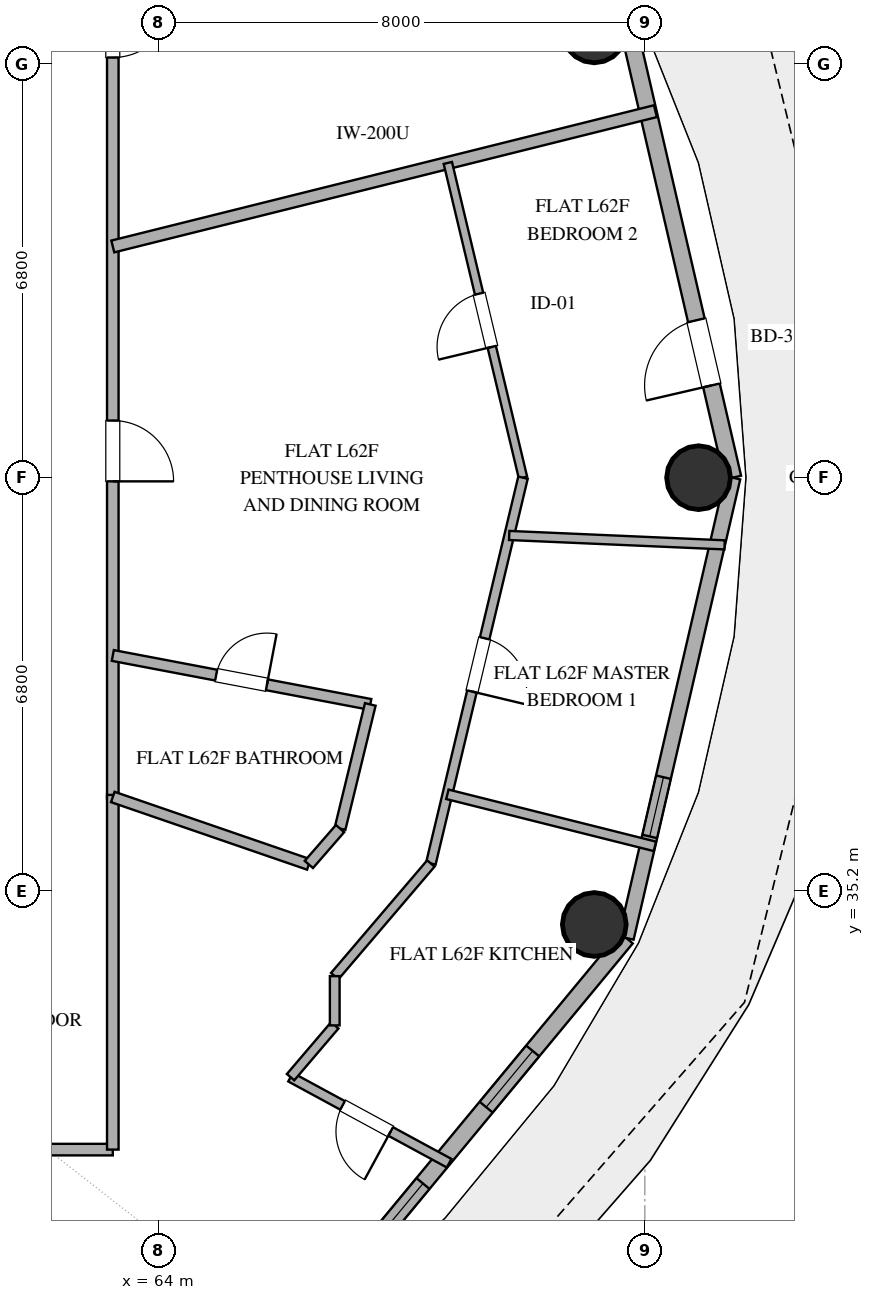
"""IFC4 building model, lengths in metres.
Left out: names, types, materials, properties, quantities, classifications, styles, units other than length and angle.
Written with IfcOpenShell. Run it as: python <this file> out.ifc"""

import sys

from ifc_helpers import new_model, si_unit, direction, frame, frame_2d, origin, origin_2d, place, context, subcontext, project, spatial, rectangle, hollow_circle, extrude, element, fill, save


model = new_model("IFC4")
c1 = context("Model", 3, precision=1e-05, world=origin(), true_north=direction((0.0, 1.0)))
c2 = subcontext(c1, "Body", "Model", "MODEL_VIEW")
j1 = project(units=[si_unit("LENGTHUNIT", "METRE"), si_unit("PLANEANGLEUNIT", "RADIAN")], contexts=[c1])
p1 = place(None, origin())
s1 = spatial("IfcSite", under=j1, at=p1, CompositionType="ELEMENT")
p2 = place(p1, origin())
s2 = spatial("IfcBuilding", under=s1, at=p2, CompositionType="ELEMENT")
p3 = place(p2, frame((0.0, 0.0, 242.4)))
s3 = spatial("IfcBuildingStorey", under=s2, at=p3, CompositionType="ELEMENT", Elevation=242.4)
for number, where, z_axis, x_axis in (
    (1, (72.883, 42.0, 0.0), (0.0, 0.0, 1.0), (1.0, 0.0, 0.0)),
    (2, (71.169, 49.347, 0.0), (0.0, 0.0, 1.0), (1.0, 0.0, 0.0)),
    (3, (71.169, 34.653, 0.0), (0.0, 0.0, 1.0), (1.0, 0.0, 0.0)),
):
    element("IfcColumn", number, at=place(p3, frame(where, z_axis=z_axis, x_axis=x_axis)), inside=s3, PredefinedType="COLUMN", context=c2, shape_type="SweptSolid", body=[
        extrude(hollow_circle(Radius=0.525, WallThickness=0.028, at=origin_2d()), origin(), (0.0, 0.0, 1.0), 3.36),
    ])
p4 = place(p3, frame((73.447, 42.0, 0.0), z_axis=(0.0, 0.0, 1.0), x_axis=(-0.225635078214, 0.974211892495, 0.0)))
e4 = element("IfcWall", 4, at=p4, inside=s3, PredefinedType="SOLIDWALL", context=c2, shape_type="SweptSolid", body=[
    extrude(rectangle(XDim=7.77, YDim=0.28, at=frame_2d((3.885, 0.0))), origin(), (0.0, 0.0, 1.0), 3.36),
])
p5 = place(p4, frame((1.557, 0.0, 0.0)))
e5 = element("IfcOpeningElement", 5, at=p5, cuts=e4, PredefinedType="OPENING", context=c2, shape_type="SweptSolid", body=[
    extrude(rectangle(XDim=1.1, YDim=2.25, at=frame_2d((0.55, 1.125))), frame((0.0, 0.15, 0.0), z_axis=(0.0, -1.0, 0.0), x_axis=(1.0, 0.0, 0.0)), (0.0, 0.0, 1.0), 0.3),
])
p6 = place(p3, frame((66.383, 28.013, 0.0), z_axis=(0.0, 0.0, 1.0), x_axis=(0.63761509934, 0.770355103243, 0.0)))
e6 = element("IfcWall", 6, at=p6, inside=s3, PredefinedType="SOLIDWALL", context=c2, shape_type="SweptSolid", body=[
    extrude(rectangle(XDim=8.33, YDim=0.28, at=frame_2d((4.165, 0.0))), origin(), (0.0, 0.0, 1.0), 3.36),
])
p7 = place(p6, frame((1.738, 0.0, 0.85)))
e7 = element("IfcOpeningElement", 7, at=p7, cuts=e6, PredefinedType="OPENING", context=c2, shape_type="SweptSolid", body=[
    extrude(rectangle(XDim=1.35, YDim=1.8, at=frame_2d((0.675, 0.9))), frame((0.0, 0.15, 0.0), z_axis=(0.0, -1.0, 0.0), x_axis=(1.0, 0.0, 0.0)), (0.0, 0.0, 1.0), 0.3),
])
p8 = place(p6, frame((4.718, 0.0, 0.85)))
e8 = element("IfcOpeningElement", 8, at=p8, cuts=e6, PredefinedType="OPENING", context=c2, shape_type="SweptSolid", body=[
    extrude(rectangle(XDim=1.2, YDim=1.8, at=frame_2d((0.6, 0.9))), frame((0.0, 0.15, 0.0), z_axis=(0.0, -1.0, 0.0), x_axis=(1.0, 0.0, 0.0)), (0.0, 0.0, 1.0), 0.3),
])
p9 = place(p3, frame((71.694, 34.43, 0.0), z_axis=(0.0, 0.0, 1.0), x_axis=(0.225635078214, 0.974211892495, 0.0)))
e9 = element("IfcWall", 9, at=p9, inside=s3, PredefinedType="SOLIDWALL", context=c2, shape_type="SweptSolid", body=[
    extrude(rectangle(XDim=7.77, YDim=0.25, at=frame_2d((3.885, 0.0))), origin(), (0.0, 0.0, 1.0), 3.36),
])
p10 = place(p9, frame((1.714, 0.0, 1.42)))
e10 = element("IfcOpeningElement", 10, at=p10, cuts=e9, PredefinedType="OPENING", context=c2, shape_type="SweptSolid", body=[
    extrude(rectangle(XDim=1.0, YDim=1.05, at=frame_2d((0.5, 0.525))), frame((0.0, 0.135, 0.0), z_axis=(0.0, -1.0, 0.0), x_axis=(1.0, 0.0, 0.0)), (0.0, 0.0, 1.0), 0.27),
])
p11 = place(p3, frame((63.25, 30.95, 0.0), z_axis=(0.0, 0.0, 1.0), x_axis=(-1.0, 0.0, 0.0)))
e11 = element("IfcWall", 11, at=p11, inside=s3, PredefinedType="PARTITIONING", context=c2, shape_type="SweptSolid", body=[
    extrude(rectangle(XDim=19.715, YDim=0.19, at=frame_2d((9.857, 0.0))), origin(), (0.0, 0.0, 1.0), 2.72),
])
p12 = place(p11, frame((11.632, 0.0, 0.0)))
e12 = element("IfcOpeningElement", 12, at=p12, cuts=e11, PredefinedType="OPENING", context=c2, shape_type="SweptSolid", body=[
    extrude(rectangle(XDim=1.0, YDim=2.2, at=frame_2d((0.5, 1.1))), frame((0.0, 0.105, 0.0), z_axis=(0.0, -1.0, 0.0), x_axis=(1.0, 0.0, 0.0)), (0.0, 0.0, 1.0), 0.21),
])
p13 = place(p3, frame((63.25, 53.05, 0.0), z_axis=(0.0, 0.0, 1.0), x_axis=(0.0, -1.0, 0.0)))
e13 = element("IfcWall", 13, at=p13, inside=s3, PredefinedType="PARTITIONING", context=c2, shape_type="SweptSolid", body=[
    extrude(rectangle(XDim=16.335, YDim=0.19, at=frame_2d((8.167, 0.0))), origin(), (0.0, 0.0, 1.0), 2.72),
])
p14 = place(p13, frame((3.14, 0.0, 0.0)))
e14 = element("IfcOpeningElement", 14, at=p14, cuts=e13, PredefinedType="OPENING", context=c2, shape_type="SweptSolid", body=[
    extrude(rectangle(XDim=1.0, YDim=2.2, at=frame_2d((0.5, 1.1))), frame((0.0, 0.105, 0.0), z_axis=(0.0, -1.0, 0.0), x_axis=(1.0, 0.0, 0.0)), (0.0, 0.0, 1.0), 0.21),
])
p15 = place(p13, frame((10.111, 0.0, 0.0)))
e15 = element("IfcOpeningElement", 15, at=p15, cuts=e13, PredefinedType="OPENING", context=c2, shape_type="SweptSolid", body=[
    extrude(rectangle(XDim=1.0, YDim=2.2, at=frame_2d((0.5, 1.1))), frame((0.0, 0.105, 0.0), z_axis=(0.0, -1.0, 0.0), x_axis=(1.0, 0.0, 0.0)), (0.0, 0.0, 1.0), 0.21),
])
p16 = place(p3, frame((63.25, 36.783, 0.0), z_axis=(0.0, 0.0, 1.0), x_axis=(0.0, -1.0, 0.0)))
e16 = element("IfcWall", 16, at=p16, inside=s3, PredefinedType="PARTITIONING", context=c2, shape_type="SweptSolid", body=[
    extrude(rectangle(XDim=5.833, YDim=0.19, at=frame_2d((2.917, 0.0))), origin(), (0.0, 0.0, 1.0), 2.72),
])
p17 = place(p3, frame((63.25, 45.802, 0.0), z_axis=(0.0, 0.0, 1.0), x_axis=(0.970293772743, 0.241929730659, 0.0)))
e17 = element("IfcWall", 17, at=p17, inside=s3, PredefinedType="PARTITIONING", context=c2, shape_type="SweptSolid", body=[
    extrude(rectangle(XDim=9.197, YDim=0.2, at=frame_2d((4.599, 0.0))), origin(), (0.0, 0.0, 1.0), 2.72),
])
p18 = place(p3, frame((69.996, 42.0, 0.0), z_axis=(0.0, 0.0, 1.0), x_axis=(-0.232321322639, 0.972639091877, 0.0)))
e18 = element("IfcWall", 18, at=p18, inside=s3, PredefinedType="PARTITIONING", context=c2, shape_type="SweptSolid", body=[
    extrude(rectangle(XDim=5.322, YDim=0.14, at=frame_2d((2.661, 0.0))), origin(), (0.0, 0.0, 1.0), 2.72),
])
p19 = place(p18, frame((2.211, 0.0, 0.0)))
e19 = element("IfcOpeningElement", 19, at=p19, cuts=e18, PredefinedType="OPENING", context=c2, shape_type="SweptSolid", body=[
    extrude(rectangle(XDim=0.9, YDim=2.1, at=frame_2d((0.45, 1.05))), frame((0.0, 0.08, 0.0), z_axis=(0.0, -1.0, 0.0), x_axis=(1.0, 0.0, 0.0)), (0.0, 0.0, 1.0), 0.16),
])
p20 = place(p3, frame((69.996, 42.0, 0.0), z_axis=(0.0, 0.0, 1.0), x_axis=(-0.232298462197, -0.972644551962, 0.0)))
e20 = element("IfcWall", 20, at=p20, inside=s3, PredefinedType="PLUMBINGWALL", context=c2, shape_type="SweptSolid", body=[
    extrude(rectangle(XDim=6.523, YDim=0.16, at=frame_2d((3.262, 0.0))), origin(), (0.0, 0.0, 1.0), 2.72),
])
p21 = place(p20, frame((2.715, 0.0, 0.0)))
e21 = element("IfcOpeningElement", 21, at=p21, cuts=e20, PredefinedType="OPENING", context=c2, shape_type="SweptSolid", body=[
    extrude(rectangle(XDim=0.9, YDim=2.1, at=frame_2d((0.45, 1.05))), frame((0.0, 0.09, 0.0), z_axis=(0.0, -1.0, 0.0), x_axis=(1.0, 0.0, 0.0)), (0.0, 0.0, 1.0), 0.18),
])
p22 = place(p3, frame((63.25, 39.076, 0.0), z_axis=(0.0, 0.0, 1.0), x_axis=(0.982398995864, -0.186794574134, 0.0)))
e22 = element("IfcWall", 22, at=p22, inside=s3, PredefinedType="PLUMBINGWALL", context=c2, shape_type="SweptSolid", body=[
    extrude(rectangle(XDim=4.311, YDim=0.18, at=frame_2d((2.155, 0.0))), origin(), (0.0, 0.0, 1.0), 2.72),
])
p23 = place(p22, frame((1.73, 0.0, 0.0)))
e23 = element("IfcOpeningElement", 23, at=p23, cuts=e22, PredefinedType="OPENING", context=c2, shape_type="SweptSolid", body=[
    extrude(rectangle(XDim=0.85, YDim=2.1, at=frame_2d((0.425, 1.05))), frame((0.0, 0.1, 0.0), z_axis=(0.0, -1.0, 0.0), x_axis=(1.0, 0.0, 0.0)), (0.0, 0.0, 1.0), 0.2),
])
p24 = place(p3, frame((73.312, 40.895, 0.0), z_axis=(0.0, 0.0, 1.0), x_axis=(-0.999049912793, 0.043580635022, 0.0)))
e24 = element("IfcWall", 24, at=p24, inside=s3, PredefinedType="PARTITIONING", context=c2, shape_type="SweptSolid", body=[
    extrude(rectangle(XDim=3.546, YDim=0.15, at=frame_2d((1.773, 0.0))), origin(), (0.0, 0.0, 1.0), 2.72),
])
p25 = place(p3, frame((72.166, 35.937, 0.0), z_axis=(0.0, 0.0, 1.0), x_axis=(-0.96994628441, 0.24331914302, 0.0)))
e25 = element("IfcWall", 25, at=p25, inside=s3, PredefinedType="PLUMBINGWALL", context=c2, shape_type="SweptSolid", body=[
    extrude(rectangle(XDim=3.519, YDim=0.16, at=frame_2d((1.759, 0.0))), origin(), (0.0, 0.0, 1.0), 2.72),
])
p26 = place(p3, frame((66.474, 35.639, 0.0), z_axis=(0.0, 0.0, 1.0), x_axis=(-0.945522773294, 0.325555963211, 0.0)))
e26 = element("IfcWall", 26, at=p26, inside=s3, PredefinedType="PLUMBINGWALL", context=c2, shape_type="SweptSolid", body=[
    extrude(rectangle(XDim=3.41, YDim=0.18, at=frame_2d((1.705, 0.0))), origin(), (0.0, 0.0, 1.0), 2.72),
])
p27 = place(p3, frame((68.781, 30.727, 0.0), z_axis=(0.0, 0.0, 1.0), x_axis=(-0.878981574643, 0.476855734408, 0.0)))
e27 = element("IfcWall", 27, at=p27, inside=s3, PredefinedType="PLUMBINGWALL", context=c2, shape_type="SweptSolid", body=[
    extrude(rectangle(XDim=2.966, YDim=0.16, at=frame_2d((1.483, 0.0))), origin(), (0.0, 0.0, 1.0), 2.72),
])
p28 = place(p27, frame((1.093, 0.0, 0.0)))
e28 = element("IfcOpeningElement", 28, at=p28, cuts=e27, PredefinedType="OPENING", context=c2, shape_type="SweptSolid", body=[
    extrude(rectangle(XDim=0.9, YDim=2.1, at=frame_2d((0.45, 1.05))), frame((0.0, 0.09, 0.0), z_axis=(0.0, -1.0, 0.0), x_axis=(1.0, 0.0, 0.0)), (0.0, 0.0, 1.0), 0.18),
])
p29 = place(p3, frame((66.9, 33.803, 0.0), z_axis=(0.0, 0.0, 1.0), x_axis=(0.649270866973, 0.760557257082, 0.0)))
e29 = element("IfcWall", 29, at=p29, inside=s3, PredefinedType="PLUMBINGWALL", context=c2, shape_type="SweptSolid", body=[
    extrude(rectangle(XDim=2.435, YDim=0.16, at=frame_2d((1.218, 0.0))), origin(), (0.0, 0.0, 1.0), 2.72),
])
p30 = place(p3, frame((67.485, 38.271, 0.0), z_axis=(0.0, 0.0, 1.0), x_axis=(-0.236517575433, -0.971627210668, 0.0)))
e30 = element("IfcWall", 30, at=p30, inside=s3, PredefinedType="PLUMBINGWALL", context=c2, shape_type="SweptSolid", body=[
    extrude(rectangle(XDim=2.102, YDim=0.18, at=frame_2d((1.051, 0.0))), origin(), (0.0, 0.0, 1.0), 2.72),
])
p31 = place(p3, frame((66.174, 32.141, 0.0), z_axis=(0.0, 0.0, 1.0), x_axis=(0.648939178463, 0.760840287219, 0.0)))
e31 = element("IfcWall", 31, at=p31, inside=s3, PredefinedType="PLUMBINGWALL", context=c2, shape_type="SweptSolid", body=[
    extrude(rectangle(XDim=1.119, YDim=0.16, at=frame_2d((0.56, 0.0))), origin(), (0.0, 0.0, 1.0), 2.72),
])
p32 = place(p3, frame((66.9, 32.993, 0.0), z_axis=(0.0, 0.0, 1.0), x_axis=(0.0, 1.0, 0.0)))
e32 = element("IfcWall", 32, at=p32, inside=s3, PredefinedType="PLUMBINGWALL", context=c2, shape_type="SweptSolid", body=[
    extrude(rectangle(XDim=0.81, YDim=0.16, at=frame_2d((0.405, 0.0))), origin(), (0.0, 0.0, 1.0), 2.72),
])
p33 = place(p3, frame((66.988, 36.229, 0.0), z_axis=(0.0, 0.0, 1.0), x_axis=(-0.656402785683, -0.754410619589, 0.0)))
e33 = element("IfcWall", 33, at=p33, inside=s3, PredefinedType="PLUMBINGWALL", context=c2, shape_type="SweptSolid", body=[
    extrude(rectangle(XDim=0.782, YDim=0.18, at=frame_2d((0.391, 0.0))), origin(), (0.0, 0.0, 1.0), 2.72),
])
p34 = place(p5, origin())
e34 = element("IfcDoor", 34, at=p34, inside=s3, OperationType="SINGLE_SWING_LEFT", PredefinedType="DOOR", context=c2, shape_type="SweptSolid", body=[
    extrude(rectangle(XDim=1.1, YDim=2.25, at=frame_2d((0.55, 1.125))), frame((0.0, 0.025, 0.0), z_axis=(0.0, -1.0, 0.0), x_axis=(1.0, 0.0, 0.0)), (0.0, 0.0, 1.0), 0.05),
])
fill(e5, e34)
p35 = place(p7, origin())
e35 = element("IfcWindow", 35, at=p35, inside=s3, PartitioningType="SINGLE_PANEL", PredefinedType="WINDOW", context=c2, shape_type="SweptSolid", body=[
    extrude(rectangle(XDim=1.35, YDim=1.8, at=frame_2d((0.675, 0.9))), frame((0.0, 0.03, 0.0), z_axis=(0.0, -1.0, 0.0), x_axis=(1.0, 0.0, 0.0)), (0.0, 0.0, 1.0), 0.06),
])
fill(e7, e35)
p36 = place(p8, origin())
e36 = element("IfcWindow", 36, at=p36, inside=s3, PartitioningType="SINGLE_PANEL", PredefinedType="WINDOW", context=c2, shape_type="SweptSolid", body=[
    extrude(rectangle(XDim=1.2, YDim=1.8, at=frame_2d((0.6, 0.9))), frame((0.0, 0.03, 0.0), z_axis=(0.0, -1.0, 0.0), x_axis=(1.0, 0.0, 0.0)), (0.0, 0.0, 1.0), 0.06),
])
fill(e8, e36)
p37 = place(p10, origin())
e37 = element("IfcWindow", 37, at=p37, inside=s3, PartitioningType="SINGLE_PANEL", PredefinedType="WINDOW", context=c2, shape_type="SweptSolid", body=[
    extrude(rectangle(XDim=1.0, YDim=1.05, at=frame_2d((0.5, 0.525))), frame((0.0, 0.03, 0.0), z_axis=(0.0, -1.0, 0.0), x_axis=(1.0, 0.0, 0.0)), (0.0, 0.0, 1.0), 0.06),
])
fill(e10, e37)
p38 = place(p14, origin())
e38 = element("IfcDoor", 38, at=p38, inside=s3, OperationType="SINGLE_SWING_LEFT", PredefinedType="DOOR", context=c2, shape_type="SweptSolid", body=[
    extrude(rectangle(XDim=1.0, YDim=2.2, at=frame_2d((0.5, 1.1))), frame((0.0, 0.025, 0.0), z_axis=(0.0, -1.0, 0.0), x_axis=(1.0, 0.0, 0.0)), (0.0, 0.0, 1.0), 0.05),
])
fill(e14, e38)
p39 = place(p15, origin())
e39 = element("IfcDoor", 39, at=p39, inside=s3, OperationType="SINGLE_SWING_RIGHT", PredefinedType="DOOR", context=c2, shape_type="SweptSolid", body=[
    extrude(rectangle(XDim=1.0, YDim=2.2, at=frame_2d((0.5, 1.1))), frame((0.0, 0.025, 0.0), z_axis=(0.0, -1.0, 0.0), x_axis=(1.0, 0.0, 0.0)), (0.0, 0.0, 1.0), 0.05),
])
fill(e15, e39)
p40 = place(p19, origin())
e40 = element("IfcDoor", 40, at=p40, inside=s3, OperationType="SINGLE_SWING_LEFT", PredefinedType="DOOR", context=c2, shape_type="SweptSolid", body=[
    extrude(rectangle(XDim=0.9, YDim=2.1, at=frame_2d((0.45, 1.05))), frame((0.0, 0.025, 0.0), z_axis=(0.0, -1.0, 0.0), x_axis=(1.0, 0.0, 0.0)), (0.0, 0.0, 1.0), 0.05),
])
fill(e19, e40)
p41 = place(p21, origin())
e41 = element("IfcDoor", 41, at=p41, inside=s3, OperationType="SINGLE_SWING_RIGHT", PredefinedType="DOOR", context=c2, shape_type="SweptSolid", body=[
    extrude(rectangle(XDim=0.9, YDim=2.1, at=frame_2d((0.45, 1.05))), frame((0.0, 0.025, 0.0), z_axis=(0.0, -1.0, 0.0), x_axis=(1.0, 0.0, 0.0)), (0.0, 0.0, 1.0), 0.05),
])
fill(e21, e41)
p42 = place(p23, origin())
e42 = element("IfcDoor", 42, at=p42, inside=s3, OperationType="SINGLE_SWING_RIGHT", PredefinedType="DOOR", context=c2, shape_type="SweptSolid", body=[
    extrude(rectangle(XDim=0.85, YDim=2.1, at=frame_2d((0.425, 1.05))), frame((0.0, 0.025, 0.0), z_axis=(0.0, -1.0, 0.0), x_axis=(1.0, 0.0, 0.0)), (0.0, 0.0, 1.0), 0.05),
])
fill(e23, e42)
p43 = place(p28, origin())
e43 = element("IfcDoor", 43, at=p43, inside=s3, OperationType="SINGLE_SWING_LEFT", PredefinedType="DOOR", context=c2, shape_type="SweptSolid", body=[
    extrude(rectangle(XDim=0.9, YDim=2.1, at=frame_2d((0.45, 1.05))), frame((0.0, 0.025, 0.0), z_axis=(0.0, -1.0, 0.0), x_axis=(1.0, 0.0, 0.0)), (0.0, 0.0, 1.0), 0.05),
])
fill(e28, e43)
save(model, sys.argv[1])
